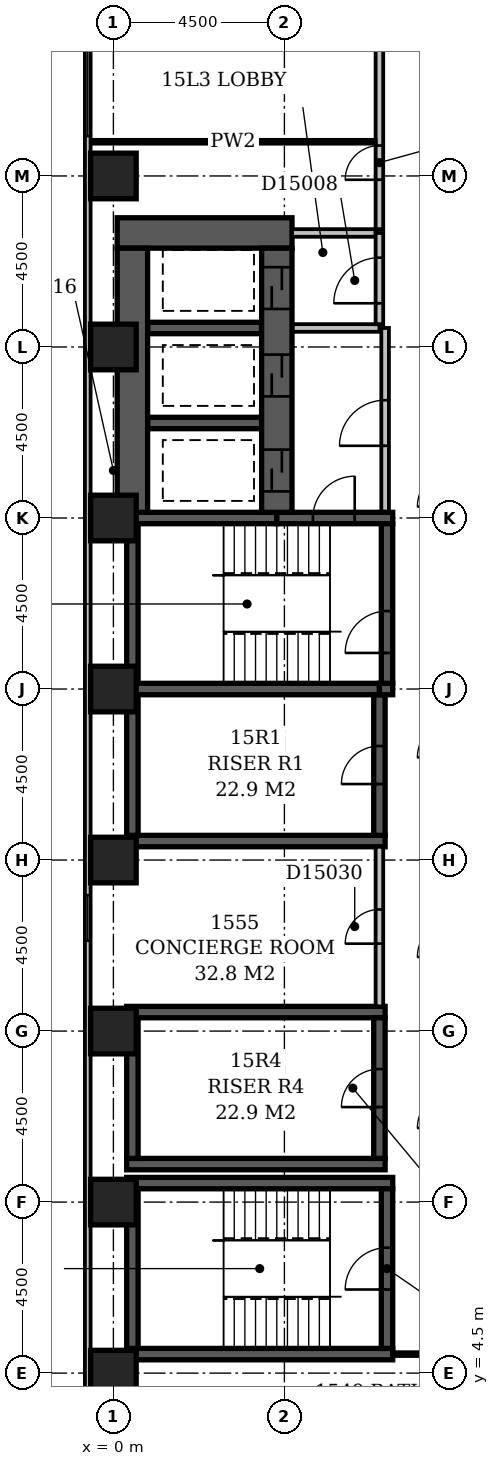
"""IFC4 building model, lengths in metres.
Left out: names, types, materials, properties, quantities, classifications, styles, units other than length and angle.
Written with IfcOpenShell. Run it as: python <this file> out.ifc"""

import sys

from ifc_helpers import new_model, si_unit, direction, frame, frame_2d, origin, origin_2d, place, context, subcontext, project, spatial, rectangle, extrude, element, fill, save


model = new_model("IFC4")
c1 = context("Model", 3, precision=1e-05, world=origin(), true_north=direction((0.0, 1.0)))
c2 = subcontext(c1, "Body", "Model", "MODEL_VIEW")
j1 = project(units=[si_unit("LENGTHUNIT", "METRE"), si_unit("PLANEANGLEUNIT", "RADIAN")], contexts=[c1])
p1 = place(None, origin())
s1 = spatial("IfcSite", under=j1, at=p1, CompositionType="ELEMENT")
p2 = place(p1, origin())
s2 = spatial("IfcBuilding", under=s1, at=p2, CompositionType="ELEMENT")
p3 = place(p2, frame((0.0, 0.0, 65.0)))
s3 = spatial("IfcBuildingStorey", under=s2, at=p3, CompositionType="ELEMENT", Elevation=65.0)
p4 = place(p3, frame((0.1, 34.5, -0.3), z_axis=(0.0, 0.0, 1.0), x_axis=(1.0, 0.0, 0.0)))
e1 = element("IfcWall", 1, at=p4, inside=s3, PredefinedType="SHEAR", context=c2, shape_type="SweptSolid", body=[
    extrude(rectangle(XDim=4.6, YDim=0.8, at=frame_2d((2.3, 0.0))), origin(), (0.0, 0.0, 1.0), 3.6),
])
for number, where, z_axis, x_axis in (
    (2, (0.35, 5.0, -0.3), (0.0, 0.0, 1.0), (1.0, 0.0, 0.0)),
    (3, (0.35, 9.5, -0.3), (0.0, 0.0, 1.0), (1.0, 0.0, 0.0)),
):
    element("IfcWall", number, at=place(p3, frame(where, z_axis=z_axis, x_axis=x_axis)), inside=s3, PredefinedType="SHEAR", context=c2, shape_type="SweptSolid", body=[
        extrude(rectangle(XDim=7.0, YDim=0.3, at=frame_2d((3.5, 0.0))), origin(), (0.0, 0.0, 1.0), 3.6),
    ])
for number, where, z_axis, x_axis in (
    (4, (0.35, 10.0, -0.3), (0.0, 0.0, 1.0), (1.0, 0.0, 0.0)),
    (5, (0.35, 14.0, -0.3), (0.0, 0.0, 1.0), (1.0, 0.0, 0.0)),
    (6, (0.35, 18.5, -0.3), (0.0, 0.0, 1.0), (1.0, 0.0, 0.0)),
):
    element("IfcWall", number, at=place(p3, frame(where, z_axis=z_axis, x_axis=x_axis)), inside=s3, PredefinedType="SHEAR", context=c2, shape_type="SweptSolid", body=[
        extrude(rectangle(XDim=6.8, YDim=0.3, at=frame_2d((3.4, 0.0))), origin(), (0.0, 0.0, 1.0), 3.6),
    ])
p5 = place(p3, frame((0.35, 22.5, -0.3), z_axis=(0.0, 0.0, 1.0), x_axis=(1.0, 0.0, 0.0)))
e7 = element("IfcWall", 7, at=p5, inside=s3, PredefinedType="SHEAR", context=c2, shape_type="SweptSolid", body=[
    extrude(rectangle(XDim=6.65, YDim=0.3, at=frame_2d((3.325, 0.0))), origin(), (0.0, 0.0, 1.0), 3.6),
])
p6 = place(p3, frame((0.35, 27.0, -0.3), z_axis=(0.0, 0.0, 1.0), x_axis=(1.0, 0.0, 0.0)))
e8 = element("IfcWall", 8, at=p6, inside=s3, PredefinedType="SHEAR", context=c2, shape_type="SweptSolid", body=[
    extrude(rectangle(XDim=3.95, YDim=0.3, at=frame_2d((1.975, 0.0))), origin(), (0.0, 0.0, 1.0), 3.6),
])
p7 = place(p3, frame((0.5, 5.15, -0.3), z_axis=(0.0, 0.0, 1.0), x_axis=(0.0, 1.0, 0.0)))
e9 = element("IfcWall", 9, at=p7, inside=s3, PredefinedType="SHEAR", context=c2, shape_type="SweptSolid", body=[
    extrude(rectangle(XDim=4.2, YDim=0.3, at=frame_2d((2.1, 0.0))), origin(), (0.0, 0.0, 1.0), 3.6),
])
for number, where, z_axis, x_axis in (
    (10, (0.5, 10.15, -0.3), (0.0, 0.0, 1.0), (0.0, 1.0, 0.0)),
    (11, (0.5, 18.65, -0.3), (0.0, 0.0, 1.0), (0.0, 1.0, 0.0)),
):
    element("IfcWall", number, at=place(p3, frame(where, z_axis=z_axis, x_axis=x_axis)), inside=s3, PredefinedType="SHEAR", context=c2, shape_type="SweptSolid", body=[
        extrude(rectangle(XDim=3.7, YDim=0.3, at=frame_2d((1.85, 0.0))), origin(), (0.0, 0.0, 1.0), 3.6),
    ])
p8 = place(p3, frame((0.5, 22.65, -0.3), z_axis=(0.0, 0.0, 1.0), x_axis=(0.0, 1.0, 0.0)))
e12 = element("IfcWall", 12, at=p8, inside=s3, PredefinedType="SHEAR", context=c2, shape_type="SweptSolid", body=[
    extrude(rectangle(XDim=4.2, YDim=0.3, at=frame_2d((2.1, 0.0))), origin(), (0.0, 0.0, 1.0), 3.6),
])
p9 = place(p3, frame((0.5, 27.15, -0.3), z_axis=(0.0, 0.0, 1.0), x_axis=(0.0, 1.0, 0.0)))
e13 = element("IfcWall", 13, at=p9, inside=s3, PredefinedType="SHEAR", context=c2, shape_type="SweptSolid", body=[
    extrude(rectangle(XDim=6.95, YDim=0.8, at=frame_2d((3.475, 0.0))), origin(), (0.0, 0.0, 1.0), 3.6),
])
for number, where, z_axis, x_axis in (
    (14, (0.9, 29.5, -0.3), (0.0, 0.0, 1.0), (1.0, 0.0, 0.0)),
    (15, (0.9, 32.0, -0.3), (0.0, 0.0, 1.0), (1.0, 0.0, 0.0)),
):
    element("IfcWall", number, at=place(p3, frame(where, z_axis=z_axis, x_axis=x_axis)), inside=s3, PredefinedType="SHEAR", context=c2, shape_type="SweptSolid", body=[
        extrude(rectangle(XDim=3.0, YDim=0.3, at=frame_2d((1.5, 0.0))), origin(), (0.0, 0.0, 1.0), 3.6),
    ])
p10 = place(p3, frame((4.3, 27.0, -0.3), z_axis=(0.0, 0.0, 1.0), x_axis=(1.0, 0.0, 0.0)))
e16 = element("IfcWall", 16, at=p10, inside=s3, PredefinedType="SHEAR", context=c2, shape_type="SweptSolid", body=[
    extrude(rectangle(XDim=3.05, YDim=0.3, at=frame_2d((1.525, 0.0))), origin(), (0.0, 0.0, 1.0), 3.6),
])
p11 = place(p10, frame((0.95, 0.0, 0.3)))
e17 = element("IfcOpeningElement", 17, at=p11, cuts=e16, PredefinedType="OPENING", context=c2, shape_type="SweptSolid", body=[
    extrude(rectangle(XDim=1.1, YDim=2.1, at=frame_2d((0.55, 1.05))), frame((0.0, 0.162, 0.0), z_axis=(0.0, -1.0, 0.0), x_axis=(1.0, 0.0, 0.0)), (0.0, 0.0, 1.0), 0.324),
])
p12 = place(p3, frame((4.3, 27.15, -0.3), z_axis=(0.0, 0.0, 1.0), x_axis=(0.0, 1.0, 0.0)))
e18 = element("IfcWall", 18, at=p12, inside=s3, PredefinedType="SHEAR", context=c2, shape_type="SweptSolid", body=[
    extrude(rectangle(XDim=6.95, YDim=0.8, at=frame_2d((3.475, 0.0))), origin(), (0.0, 0.0, 1.0), 3.6),
])
p13 = place(p12, frame((3.05, 0.0, 0.3)))
e19 = element("IfcOpeningElement", 19, at=p13, cuts=e18, PredefinedType="OPENING", context=c2, shape_type="SweptSolid", body=[
    extrude(rectangle(XDim=1.1, YDim=2.1, at=frame_2d((0.55, 1.05))), frame((0.0, 0.412, 0.0), z_axis=(0.0, -1.0, 0.0), x_axis=(1.0, 0.0, 0.0)), (0.0, 0.0, 1.0), 0.824),
])
p14 = place(p12, frame((0.55, 0.0, 0.3)))
e20 = element("IfcOpeningElement", 20, at=p14, cuts=e18, PredefinedType="OPENING", context=c2, shape_type="SweptSolid", body=[
    extrude(rectangle(XDim=1.1, YDim=2.1, at=frame_2d((0.55, 1.05))), frame((0.0, 0.412, 0.0), z_axis=(0.0, -1.0, 0.0), x_axis=(1.0, 0.0, 0.0)), (0.0, 0.0, 1.0), 0.824),
])
p15 = place(p12, frame((5.35, 0.0, 0.3)))
e21 = element("IfcOpeningElement", 21, at=p15, cuts=e18, PredefinedType="OPENING", context=c2, shape_type="SweptSolid", body=[
    extrude(rectangle(XDim=1.1, YDim=2.1, at=frame_2d((0.55, 1.05))), frame((0.0, 0.412, 0.0), z_axis=(0.0, -1.0, 0.0), x_axis=(1.0, 0.0, 0.0)), (0.0, 0.0, 1.0), 0.824),
])
p16 = place(p3, frame((7.0, 10.15, -0.3), z_axis=(0.0, 0.0, 1.0), x_axis=(0.0, 1.0, 0.0)))
e22 = element("IfcWall", 22, at=p16, inside=s3, PredefinedType="SHEAR", context=c2, shape_type="SweptSolid", body=[
    extrude(rectangle(XDim=3.7, YDim=0.3, at=frame_2d((1.85, 0.0))), origin(), (0.0, 0.0, 1.0), 3.6),
])
p17 = place(p16, frame((1.35, 0.0, 0.3)))
e23 = element("IfcOpeningElement", 23, at=p17, cuts=e22, PredefinedType="OPENING", context=c2, shape_type="SweptSolid", body=[
    extrude(rectangle(XDim=1.0, YDim=2.1, at=frame_2d((0.5, 1.05))), frame((0.0, 0.162, 0.0), z_axis=(0.0, -1.0, 0.0), x_axis=(1.0, 0.0, 0.0)), (0.0, 0.0, 1.0), 0.324),
])
p18 = place(p3, frame((7.0, 18.65, -0.3), z_axis=(0.0, 0.0, 1.0), x_axis=(0.0, 1.0, 0.0)))
e24 = element("IfcWall", 24, at=p18, inside=s3, PredefinedType="SHEAR", context=c2, shape_type="SweptSolid", body=[
    extrude(rectangle(XDim=3.7, YDim=0.3, at=frame_2d((1.85, 0.0))), origin(), (0.0, 0.0, 1.0), 3.6),
])
p19 = place(p18, frame((1.35, 0.0, 0.3)))
e25 = element("IfcOpeningElement", 25, at=p19, cuts=e24, PredefinedType="OPENING", context=c2, shape_type="SweptSolid", body=[
    extrude(rectangle(XDim=1.0, YDim=2.1, at=frame_2d((0.5, 1.05))), frame((0.0, 0.162, 0.0), z_axis=(0.0, -1.0, 0.0), x_axis=(1.0, 0.0, 0.0)), (0.0, 0.0, 1.0), 0.324),
])
p20 = place(p3, frame((7.0, 22.5, -0.3), z_axis=(0.0, 0.0, 1.0), x_axis=(1.0, 0.0, 0.0)))
e26 = element("IfcWall", 26, at=p20, inside=s3, PredefinedType="SHEAR", context=c2, shape_type="SweptSolid", body=[
    extrude(rectangle(XDim=0.35, YDim=0.3, at=frame_2d((0.175, 0.0))), origin(), (0.0, 0.0, 1.0), 3.6),
])
p21 = place(p3, frame((7.2, 5.15, -0.3), z_axis=(0.0, 0.0, 1.0), x_axis=(0.0, 1.0, 0.0)))
e27 = element("IfcWall", 27, at=p21, inside=s3, PredefinedType="SHEAR", context=c2, shape_type="SweptSolid", body=[
    extrude(rectangle(XDim=4.2, YDim=0.3, at=frame_2d((2.1, 0.0))), origin(), (0.0, 0.0, 1.0), 3.6),
])
p22 = place(p21, frame((1.55, 0.0, 0.3)))
e28 = element("IfcOpeningElement", 28, at=p22, cuts=e27, PredefinedType="OPENING", context=c2, shape_type="SweptSolid", body=[
    extrude(rectangle(XDim=1.1, YDim=2.1, at=frame_2d((0.55, 1.05))), frame((0.0, 0.162, 0.0), z_axis=(0.0, -1.0, 0.0), x_axis=(1.0, 0.0, 0.0)), (0.0, 0.0, 1.0), 0.324),
])
p23 = place(p3, frame((7.2, 22.65, -0.3), z_axis=(0.0, 0.0, 1.0), x_axis=(0.0, 1.0, 0.0)))
e29 = element("IfcWall", 29, at=p23, inside=s3, PredefinedType="SHEAR", context=c2, shape_type="SweptSolid", body=[
    extrude(rectangle(XDim=4.2, YDim=0.3, at=frame_2d((2.1, 0.0))), origin(), (0.0, 0.0, 1.0), 3.6),
])
p24 = place(p23, frame((0.8, 0.0, 0.3)))
e30 = element("IfcOpeningElement", 30, at=p24, cuts=e29, PredefinedType="OPENING", context=c2, shape_type="SweptSolid", body=[
    extrude(rectangle(XDim=1.1, YDim=2.1, at=frame_2d((0.55, 1.05))), frame((0.0, 0.162, 0.0), z_axis=(0.0, -1.0, 0.0), x_axis=(1.0, 0.0, 0.0)), (0.0, 0.0, 1.0), 0.324),
])
for number, where, z_axis, x_axis in (
    (31, (0.0, 4.5, -0.3), (0.0, 0.0, 1.0), (1.0, 0.0, 0.0)),
    (32, (0.0, 9.0, -0.3), (0.0, 0.0, 1.0), (1.0, 0.0, 0.0)),
    (33, (0.0, 13.5, -0.3), (0.0, 0.0, 1.0), (1.0, 0.0, 0.0)),
    (34, (0.0, 18.0, -0.3), (0.0, 0.0, 1.0), (1.0, 0.0, 0.0)),
    (35, (0.0, 22.5, -0.3), (0.0, 0.0, 1.0), (1.0, 0.0, 0.0)),
    (36, (0.0, 27.0, -0.3), (0.0, 0.0, 1.0), (1.0, 0.0, 0.0)),
    (37, (0.0, 31.5, -0.3), (0.0, 0.0, 1.0), (1.0, 0.0, 0.0)),
    (38, (0.0, 36.0, -0.3), (0.0, 0.0, 1.0), (1.0, 0.0, 0.0)),
):
    element("IfcColumn", number, at=place(p3, frame(where, z_axis=z_axis, x_axis=x_axis)), inside=s3, PredefinedType="COLUMN", context=c2, shape_type="SweptSolid", body=[
        extrude(rectangle(XDim=1.2, YDim=1.2, at=origin_2d()), origin(), (0.0, 0.0, 1.0), 3.6),
    ])
p25 = place(p3, frame((-0.675, 59.1, 0.0), z_axis=(0.0, 0.0, 1.0), x_axis=(0.0, -1.0, 0.0)))
e39 = element("IfcWall", 39, at=p25, inside=s3, PredefinedType="STANDARD", context=c2, shape_type="SweptSolid", body=[
    extrude(rectangle(XDim=55.35, YDim=0.15, at=frame_2d((27.675, 0.0))), origin(), (0.0, 0.0, 1.0), 2.7),
])
p26 = place(p25, frame((15.023, 0.0, 0.6)))
e40 = element("IfcOpeningElement", 40, at=p26, cuts=e39, PredefinedType="OPENING", context=c2, shape_type="SweptSolid", body=[
    extrude(rectangle(XDim=1.2, YDim=1.8, at=frame_2d((0.6, 0.9))), frame((0.0, 0.087, 0.0), z_axis=(0.0, -1.0, 0.0), x_axis=(1.0, 0.0, 0.0)), (0.0, 0.0, 1.0), 0.174),
])
p27 = place(p25, frame((19.65, 0.0, 0.6)))
e41 = element("IfcOpeningElement", 41, at=p27, cuts=e39, PredefinedType="OPENING", context=c2, shape_type="SweptSolid", body=[
    extrude(rectangle(XDim=2.4, YDim=1.8, at=frame_2d((1.2, 0.9))), frame((0.0, 0.087, 0.0), z_axis=(0.0, -1.0, 0.0), x_axis=(1.0, 0.0, 0.0)), (0.0, 0.0, 1.0), 0.174),
])
p28 = place(p25, frame((42.023, 0.0, 0.6)))
e42 = element("IfcOpeningElement", 42, at=p28, cuts=e39, PredefinedType="OPENING", context=c2, shape_type="SweptSolid", body=[
    extrude(rectangle(XDim=1.2, YDim=1.8, at=frame_2d((0.6, 0.9))), frame((0.0, 0.087, 0.0), z_axis=(0.0, -1.0, 0.0), x_axis=(1.0, 0.0, 0.0)), (0.0, 0.0, 1.0), 0.174),
])
p29 = place(p3, frame((4.72, 32.0, 0.0), z_axis=(0.0, 0.0, 1.0), x_axis=(1.0, 0.0, 0.0)))
e43 = element("IfcWall", 43, at=p29, inside=s3, PredefinedType="PARTITIONING", context=c2, shape_type="SweptSolid", body=[
    extrude(rectangle(XDim=2.28, YDim=0.2, at=frame_2d((1.14, 0.0))), origin(), (0.0, 0.0, 1.0), 3.3),
])
p30 = place(p3, frame((7.0, 32.1, 0.0), z_axis=(0.0, 0.0, 1.0), x_axis=(0.0, 1.0, 0.0)))
e44 = element("IfcWall", 44, at=p30, inside=s3, PredefinedType="PARTITIONING", context=c2, shape_type="SweptSolid", body=[
    extrude(rectangle(XDim=2.4, YDim=0.2, at=frame_2d((1.2, 0.0))), origin(), (0.0, 0.0, 1.0), 3.3),
])
p31 = place(p30, frame((0.55, 0.0, 0.0)))
e45 = element("IfcOpeningElement", 45, at=p31, cuts=e44, PredefinedType="OPENING", context=c2, shape_type="SweptSolid", body=[
    extrude(rectangle(XDim=1.2, YDim=2.1, at=frame_2d((0.6, 1.05))), frame((0.0, 0.112, 0.0), z_axis=(0.0, -1.0, 0.0), x_axis=(1.0, 0.0, 0.0)), (0.0, 0.0, 1.0), 0.224),
])
p32 = place(p3, frame((4.7, 34.5, 0.0), z_axis=(0.0, 0.0, 1.0), x_axis=(1.0, 0.0, 0.0)))
e46 = element("IfcWall", 46, at=p32, inside=s3, PredefinedType="PARTITIONING", context=c2, shape_type="SweptSolid", body=[
    extrude(rectangle(XDim=2.2, YDim=0.2, at=frame_2d((1.1, 0.0))), origin(), (0.0, 0.0, 1.0), 3.3),
])
p33 = place(p3, frame((7.15, 27.17, 0.0), z_axis=(0.0, 0.0, 1.0), x_axis=(0.0, 1.0, 0.0)))
e47 = element("IfcWall", 47, at=p33, inside=s3, PredefinedType="PARTITIONING", context=c2, shape_type="SweptSolid", body=[
    extrude(rectangle(XDim=4.83, YDim=0.2, at=frame_2d((2.415, 0.0))), origin(), (0.0, 0.0, 1.0), 3.3),
])
p34 = place(p33, frame((1.73, 0.0, 0.0)))
e48 = element("IfcOpeningElement", 48, at=p34, cuts=e47, PredefinedType="OPENING", context=c2, shape_type="SweptSolid", body=[
    extrude(rectangle(XDim=1.2, YDim=2.1, at=frame_2d((0.6, 1.05))), frame((0.0, 0.112, 0.0), z_axis=(0.0, -1.0, 0.0), x_axis=(1.0, 0.0, 0.0)), (0.0, 0.0, 1.0), 0.224),
])
p35 = place(p3, frame((0.0, 4.4, 0.0), z_axis=(0.0, 0.0, 1.0), x_axis=(0.0, 1.0, 0.0)))
e49 = element("IfcWall", 49, at=p35, inside=s3, PredefinedType="PARTITIONING", context=c2, shape_type="SweptSolid", body=[
    extrude(rectangle(XDim=0.7, YDim=0.1, at=frame_2d((0.35, 0.0))), origin(), (0.0, 0.0, 1.0), 2.7),
])
p36 = place(p3, frame((7.349, 5.0, 0.0), z_axis=(0.0, 0.0, 1.0), x_axis=(1.0, 0.0, 0.0)))
e50 = element("IfcWall", 50, at=p36, inside=s3, PredefinedType="PARTITIONING", context=c2, shape_type="SweptSolid", body=[
    extrude(rectangle(XDim=1.551, YDim=0.1, at=frame_2d((0.775, 0.0))), origin(), (0.0, 0.0, 1.0), 3.3),
])
p37 = place(p3, frame((7.0, 14.15, 0.0), z_axis=(0.0, 0.0, 1.0), x_axis=(0.0, 1.0, 0.0)))
e51 = element("IfcWall", 51, at=p37, inside=s3, PredefinedType="PARTITIONING", context=c2, shape_type="SweptSolid", body=[
    extrude(rectangle(XDim=4.2, YDim=0.2, at=frame_2d((2.1, 0.0))), origin(), (0.0, 0.0, 1.0), 3.3),
])
p38 = place(p37, frame((1.65, 0.0, 0.0)))
e52 = element("IfcOpeningElement", 52, at=p38, cuts=e51, PredefinedType="OPENING", context=c2, shape_type="SweptSolid", body=[
    extrude(rectangle(XDim=0.9, YDim=2.1, at=frame_2d((0.45, 1.05))), frame((0.0, 0.112, 0.0), z_axis=(0.0, -1.0, 0.0), x_axis=(1.0, 0.0, 0.0)), (0.0, 0.0, 1.0), 0.224),
])
p39 = place(p3, frame((7.0, 34.6, 0.0), z_axis=(0.0, 0.0, 1.0), x_axis=(0.0, 1.0, 0.0)))
e53 = element("IfcWall", 53, at=p39, inside=s3, PredefinedType="PARTITIONING", context=c2, shape_type="SweptSolid", body=[
    extrude(rectangle(XDim=14.8, YDim=0.2, at=frame_2d((7.4, 0.0))), origin(), (0.0, 0.0, 1.0), 3.3),
])
p40 = place(p39, frame((1.3, 0.0, 0.0)))
e54 = element("IfcOpeningElement", 54, at=p40, cuts=e53, PredefinedType="OPENING", context=c2, shape_type="SweptSolid", body=[
    extrude(rectangle(XDim=0.9, YDim=2.1, at=frame_2d((0.45, 1.05))), frame((0.0, 0.112, 0.0), z_axis=(0.0, -1.0, 0.0), x_axis=(1.0, 0.0, 0.0)), (0.0, 0.0, 1.0), 0.224),
])
p41 = place(p39, frame((6.95, 0.0, 0.0)))
e55 = element("IfcOpeningElement", 55, at=p41, cuts=e53, PredefinedType="OPENING", context=c2, shape_type="SweptSolid", body=[
    extrude(rectangle(XDim=0.9, YDim=2.1, at=frame_2d((0.45, 1.05))), frame((0.0, 0.112, 0.0), z_axis=(0.0, -1.0, 0.0), x_axis=(1.0, 0.0, 0.0)), (0.0, 0.0, 1.0), 0.224),
])
p42 = place(p39, frame((12.525, 0.0, 0.0)))
e56 = element("IfcOpeningElement", 56, at=p42, cuts=e53, PredefinedType="OPENING", context=c2, shape_type="SweptSolid", body=[
    extrude(rectangle(XDim=1.0, YDim=2.1, at=frame_2d((0.5, 1.05))), frame((0.0, 0.112, 0.0), z_axis=(0.0, -1.0, 0.0), x_axis=(1.0, 0.0, 0.0)), (0.0, 0.0, 1.0), 0.224),
])
p43 = place(p3, frame((-0.6, 36.9, 0.0), z_axis=(0.0, 0.0, 1.0), x_axis=(1.0, 0.0, 0.0)))
e57 = element("IfcWall", 57, at=p43, inside=s3, PredefinedType="PARTITIONING", context=c2, shape_type="SweptSolid", body=[
    extrude(rectangle(XDim=7.5, YDim=0.1, at=frame_2d((3.75, 0.0))), origin(), (0.0, 0.0, 1.0), 3.3),
])
p44 = place(p27, origin())
e58 = element("IfcWindow", 58, at=p44, inside=s3, PartitioningType="SINGLE_PANEL", PredefinedType="WINDOW", context=c2, shape_type="SweptSolid", body=[
    extrude(rectangle(XDim=2.4, YDim=1.8, at=frame_2d((1.2, 0.9))), frame((0.0, 0.03, 0.0), z_axis=(0.0, -1.0, 0.0), x_axis=(1.0, 0.0, 0.0)), (0.0, 0.0, 1.0), 0.06),
])
fill(e41, e58)
p45 = place(p28, origin())
e59 = element("IfcWindow", 59, at=p45, inside=s3, PartitioningType="SINGLE_PANEL", PredefinedType="WINDOW", context=c2, shape_type="SweptSolid", body=[
    extrude(rectangle(XDim=1.2, YDim=1.8, at=frame_2d((0.6, 0.9))), frame((0.0, 0.03, 0.0), z_axis=(0.0, -1.0, 0.0), x_axis=(1.0, 0.0, 0.0)), (0.0, 0.0, 1.0), 0.06),
])
fill(e42, e59)
p46 = place(p34, origin())
e60 = element("IfcDoor", 60, at=p46, inside=s3, OperationType="SINGLE_SWING_LEFT", PredefinedType="DOOR", context=c2, shape_type="SweptSolid", body=[
    extrude(rectangle(XDim=1.2, YDim=2.1, at=frame_2d((0.6, 1.05))), frame((0.0, 0.025, 0.0), z_axis=(0.0, -1.0, 0.0), x_axis=(1.0, 0.0, 0.0)), (0.0, 0.0, 1.0), 0.05),
])
fill(e48, e60)
p47 = place(p13, origin())
e61 = element("IfcDoor", 61, at=p47, inside=s3, OperationType="SLIDING_TO_LEFT", PredefinedType="DOOR", context=c2, shape_type="SweptSolid", body=[
    extrude(rectangle(XDim=1.1, YDim=2.1, at=frame_2d((0.55, 1.05))), frame((0.0, 0.025, 0.0), z_axis=(0.0, -1.0, 0.0), x_axis=(1.0, 0.0, 0.0)), (0.0, 0.0, 1.0), 0.05),
])
fill(e19, e61)
p48 = place(p14, origin())
e62 = element("IfcDoor", 62, at=p48, inside=s3, OperationType="SLIDING_TO_LEFT", PredefinedType="DOOR", context=c2, shape_type="SweptSolid", body=[
    extrude(rectangle(XDim=1.1, YDim=2.1, at=frame_2d((0.55, 1.05))), frame((0.0, 0.025, 0.0), z_axis=(0.0, -1.0, 0.0), x_axis=(1.0, 0.0, 0.0)), (0.0, 0.0, 1.0), 0.05),
])
fill(e20, e62)
p49 = place(p31, origin())
e63 = element("IfcDoor", 63, at=p49, inside=s3, OperationType="SINGLE_SWING_LEFT", PredefinedType="DOOR", context=c2, shape_type="SweptSolid", body=[
    extrude(rectangle(XDim=1.2, YDim=2.1, at=frame_2d((0.6, 1.05))), frame((0.0, 0.025, 0.0), z_axis=(0.0, -1.0, 0.0), x_axis=(1.0, 0.0, 0.0)), (0.0, 0.0, 1.0), 0.05),
])
fill(e45, e63)
p50 = place(p15, origin())
e64 = element("IfcDoor", 64, at=p50, inside=s3, OperationType="SLIDING_TO_LEFT", PredefinedType="DOOR", context=c2, shape_type="SweptSolid", body=[
    extrude(rectangle(XDim=1.1, YDim=2.1, at=frame_2d((0.55, 1.05))), frame((0.0, 0.025, 0.0), z_axis=(0.0, -1.0, 0.0), x_axis=(1.0, 0.0, 0.0)), (0.0, 0.0, 1.0), 0.05),
])
fill(e21, e64)
p51 = place(p19, origin())
e65 = element("IfcDoor", 65, at=p51, inside=s3, OperationType="SINGLE_SWING_LEFT", PredefinedType="DOOR", context=c2, shape_type="SweptSolid", body=[
    extrude(rectangle(XDim=1.0, YDim=2.1, at=frame_2d((0.5, 1.05))), frame((0.0, 0.025, 0.0), z_axis=(0.0, -1.0, 0.0), x_axis=(1.0, 0.0, 0.0)), (0.0, 0.0, 1.0), 0.05),
])
fill(e25, e65)
p52 = place(p17, origin())
e66 = element("IfcDoor", 66, at=p52, inside=s3, OperationType="SINGLE_SWING_LEFT", PredefinedType="DOOR", context=c2, shape_type="SweptSolid", body=[
    extrude(rectangle(XDim=1.0, YDim=2.1, at=frame_2d((0.5, 1.05))), frame((0.0, 0.025, 0.0), z_axis=(0.0, -1.0, 0.0), x_axis=(1.0, 0.0, 0.0)), (0.0, 0.0, 1.0), 0.05),
])
fill(e23, e66)
p53 = place(p11, frame((1.1, 0.0, 0.0), z_axis=(0.0, 0.0, 1.0), x_axis=(-1.0, 0.0, 0.0)))
e67 = element("IfcDoor", 67, at=p53, inside=s3, OperationType="SINGLE_SWING_LEFT", PredefinedType="DOOR", context=c2, shape_type="SweptSolid", body=[
    extrude(rectangle(XDim=1.1, YDim=2.1, at=frame_2d((0.55, 1.05))), frame((0.0, 0.025, 0.0), z_axis=(0.0, -1.0, 0.0), x_axis=(1.0, 0.0, 0.0)), (0.0, 0.0, 1.0), 0.05),
])
fill(e17, e67)
p54 = place(p24, origin())
e68 = element("IfcDoor", 68, at=p54, inside=s3, OperationType="SINGLE_SWING_LEFT", PredefinedType="DOOR", context=c2, shape_type="SweptSolid", body=[
    extrude(rectangle(XDim=1.1, YDim=2.1, at=frame_2d((0.55, 1.05))), frame((0.0, 0.025, 0.0), z_axis=(0.0, -1.0, 0.0), x_axis=(1.0, 0.0, 0.0)), (0.0, 0.0, 1.0), 0.05),
])
fill(e30, e68)
p55 = place(p22, origin())
e69 = element("IfcDoor", 69, at=p55, inside=s3, OperationType="SINGLE_SWING_LEFT", PredefinedType="DOOR", context=c2, shape_type="SweptSolid", body=[
    extrude(rectangle(XDim=1.1, YDim=2.1, at=frame_2d((0.55, 1.05))), frame((0.0, 0.025, 0.0), z_axis=(0.0, -1.0, 0.0), x_axis=(1.0, 0.0, 0.0)), (0.0, 0.0, 1.0), 0.05),
])
fill(e28, e69)
p56 = place(p38, origin())
e70 = element("IfcDoor", 70, at=p56, inside=s3, OperationType="SINGLE_SWING_LEFT", PredefinedType="DOOR", context=c2, shape_type="SweptSolid", body=[
    extrude(rectangle(XDim=0.9, YDim=2.1, at=frame_2d((0.45, 1.05))), frame((0.0, 0.025, 0.0), z_axis=(0.0, -1.0, 0.0), x_axis=(1.0, 0.0, 0.0)), (0.0, 0.0, 1.0), 0.05),
])
fill(e52, e70)
p57 = place(p40, origin())
e71 = element("IfcDoor", 71, at=p57, inside=s3, OperationType="SINGLE_SWING_LEFT", PredefinedType="DOOR", context=c2, shape_type="SweptSolid", body=[
    extrude(rectangle(XDim=0.9, YDim=2.1, at=frame_2d((0.45, 1.05))), frame((0.0, 0.025, 0.0), z_axis=(0.0, -1.0, 0.0), x_axis=(1.0, 0.0, 0.0)), (0.0, 0.0, 1.0), 0.05),
])
fill(e54, e71)
save(model, sys.argv[1])
